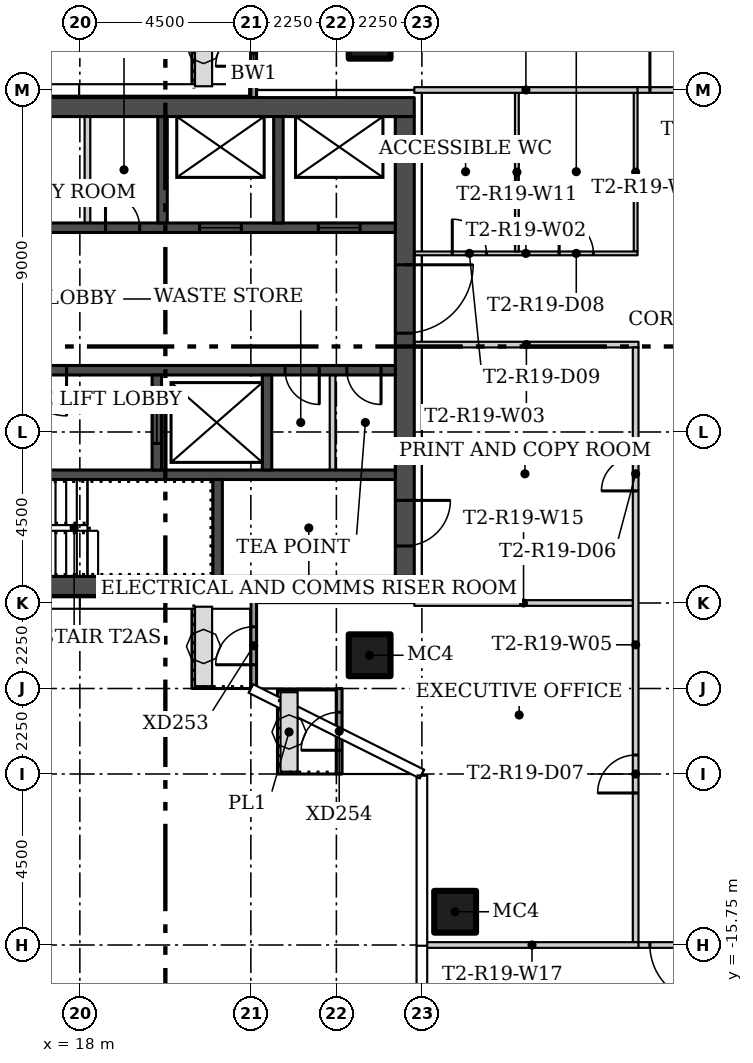
"""IFC4 building model, lengths in metres.
Left out: names, types, materials, properties, quantities, classifications, styles, units other than length and angle.
Written with IfcOpenShell. Run it as: python <this file> out.ifc"""

import sys

from ifc_helpers import new_model, si_unit, direction, frame, frame_2d, origin, origin_2d, place, context, subcontext, project, spatial, rectangle, hollow_rectangle, extrude, element, fill, save


model = new_model("IFC4")
c1 = context("Model", 3, precision=1e-05, world=origin(), true_north=direction((0.0, 1.0)))
c2 = subcontext(c1, "Body", "Model", "MODEL_VIEW")
j1 = project(units=[si_unit("LENGTHUNIT", "METRE"), si_unit("PLANEANGLEUNIT", "RADIAN")], contexts=[c1])
p1 = place(None, origin())
s1 = spatial("IfcSite", under=j1, at=p1, CompositionType="ELEMENT")
p2 = place(p1, origin())
s2 = spatial("IfcBuilding", under=s1, at=p2, CompositionType="ELEMENT")
p3 = place(p2, frame((0.0, 0.0, 170.1)))
s3 = spatial("IfcBuildingStorey", under=s2, at=p3, CompositionType="ELEMENT", Elevation=170.1)
for number, where in (
    (1, (25.625, 8.125, 0.0)),
    (2, (25.625, -8.125, 0.0)),
    (3, (27.875, -14.875, 0.0)),
):
    element("IfcColumn", number, at=place(p3, frame(where)), inside=s3, PredefinedType="COLUMN", context=c2, shape_type="SweptSolid", body=[
        extrude(hollow_rectangle(XDim=1.1, YDim=1.1, WallThickness=0.04, at=origin_2d()), origin(), (0.0, 0.0, 1.0), 3.55),
    ])
p4 = place(p3, frame((32.625, 2.5, 0.0), z_axis=(0.0, 0.0, 1.0), x_axis=(0.0, 1.0, 0.0)))
e4 = element("IfcWall", 4, at=p4, inside=s3, PredefinedType="PARTITIONING", context=c2, shape_type="SweptSolid", body=[
    extrude(rectangle(XDim=4.175, YDim=0.1, at=frame_2d((2.087, 0.0))), origin(), (0.0, 0.0, 1.0), 3.55),
])
p5 = place(p3, frame((26.8, 2.45, 0.0)))
e5 = element("IfcWall", 5, at=p5, inside=s3, PredefinedType="PARTITIONING", context=c2, shape_type="SweptSolid", body=[
    extrude(rectangle(XDim=5.875, YDim=0.1, at=frame_2d((2.938, 0.0))), origin(), (0.0, 0.0, 1.0), 3.55),
])
p6 = place(p5, frame((3.812, 0.0, 0.0)))
e6 = element("IfcOpeningElement", 6, at=p6, cuts=e5, PredefinedType="OPENING", context=c2, shape_type="SweptSolid", body=[
    extrude(rectangle(XDim=0.9, YDim=2.1, at=frame_2d((0.45, 1.05))), frame((0.0, 0.06, 0.0), z_axis=(0.0, -1.0, 0.0), x_axis=(1.0, 0.0, 0.0)), (0.0, 0.0, 1.0), 0.12),
])
p7 = place(p5, frame((1.0, 0.0, 0.0)))
e7 = element("IfcOpeningElement", 7, at=p7, cuts=e5, PredefinedType="OPENING", context=c2, shape_type="SweptSolid", body=[
    extrude(rectangle(XDim=0.9, YDim=2.1, at=frame_2d((0.45, 1.05))), frame((0.0, 0.06, 0.0), z_axis=(0.0, -1.0, 0.0), x_axis=(1.0, 0.0, 0.0)), (0.0, 0.0, 1.0), 0.12),
])
p8 = place(p3, frame((32.7, 0.05, 0.0), z_axis=(0.0, 0.0, 1.0), x_axis=(-1.0, 0.0, 0.0)))
e8 = element("IfcWall", 8, at=p8, inside=s3, PredefinedType="PARTITIONING", context=c2, shape_type="SweptSolid", body=[
    extrude(rectangle(XDim=5.9, YDim=0.15, at=frame_2d((2.95, 0.0))), origin(), (0.0, 0.0, 1.0), 3.55),
])
p9 = place(p3, frame((32.625, -15.675, 0.0), z_axis=(0.0, 0.0, 1.0), x_axis=(0.0, 1.0, 0.0)))
e9 = element("IfcWall", 9, at=p9, inside=s3, PredefinedType="PARTITIONING", context=c2, shape_type="SweptSolid", body=[
    extrude(rectangle(XDim=15.65, YDim=0.15, at=frame_2d((7.825, 0.0))), origin(), (0.0, 0.0, 1.0), 3.55),
])
p10 = place(p9, frame((11.875, 0.0, 0.0)))
e10 = element("IfcOpeningElement", 10, at=p10, cuts=e9, PredefinedType="OPENING", context=c2, shape_type="SweptSolid", body=[
    extrude(rectangle(XDim=0.9, YDim=2.1, at=frame_2d((0.45, 1.05))), frame((0.0, 0.085, 0.0), z_axis=(0.0, -1.0, 0.0), x_axis=(1.0, 0.0, 0.0)), (0.0, 0.0, 1.0), 0.17),
])
p11 = place(p9, frame((3.925, 0.0, 0.0)))
e11 = element("IfcOpeningElement", 11, at=p11, cuts=e9, PredefinedType="OPENING", context=c2, shape_type="SweptSolid", body=[
    extrude(rectangle(XDim=1.0, YDim=2.4, at=frame_2d((0.5, 1.2))), frame((0.0, 0.085, 0.0), z_axis=(0.0, -1.0, 0.0), x_axis=(1.0, 0.0, 0.0)), (0.0, 0.0, 1.0), 0.17),
])
p12 = place(p3, frame((32.575, 6.75, 0.0)))
e12 = element("IfcWall", 12, at=p12, inside=s3, PredefinedType="PARTITIONING", context=c2, shape_type="SweptSolid", body=[
    extrude(rectangle(XDim=2.375, YDim=0.15, at=frame_2d((1.188, 0.0))), origin(), (0.0, 0.0, 1.0), 3.55),
])
p13 = place(p12, frame((0.425, 0.0, 0.0)))
e13 = element("IfcOpeningElement", 13, at=p13, cuts=e12, PredefinedType="OPENING", context=c2, shape_type="SweptSolid", body=[
    extrude(rectangle(XDim=1.5, YDim=2.1, at=frame_2d((0.75, 1.05))), frame((0.0, 0.085, 0.0), z_axis=(0.0, -1.0, 0.0), x_axis=(1.0, 0.0, 0.0)), (0.0, 0.0, 1.0), 0.17),
])
p14 = place(p3, frame((34.95, -15.75, 0.0), z_axis=(0.0, 0.0, 1.0), x_axis=(-1.0, 0.0, 0.0)))
e14 = element("IfcWall", 14, at=p14, inside=s3, PredefinedType="PARTITIONING", context=c2, shape_type="SweptSolid", body=[
    extrude(rectangle(XDim=2.4, YDim=0.15, at=frame_2d((1.2, 0.0))), origin(), (0.0, 0.0, 1.0), 3.55),
])
p15 = place(p14, frame((0.45, 0.0, 0.0)))
e15 = element("IfcOpeningElement", 15, at=p15, cuts=e14, PredefinedType="OPENING", context=c2, shape_type="SweptSolid", body=[
    extrude(rectangle(XDim=1.5, YDim=2.1, at=frame_2d((0.75, 1.05))), frame((0.0, 0.085, 0.0), z_axis=(0.0, -1.0, 0.0), x_axis=(1.0, 0.0, 0.0)), (0.0, 0.0, 1.0), 0.17),
])
p16 = place(p3, frame((29.5, 6.675, 0.0), z_axis=(0.0, 0.0, 1.0), x_axis=(0.0, -1.0, 0.0)))
e16 = element("IfcWall", 16, at=p16, inside=s3, PredefinedType="PARTITIONING", context=c2, shape_type="SweptSolid", body=[
    extrude(rectangle(XDim=4.175, YDim=0.1, at=frame_2d((2.087, 0.0))), origin(), (0.0, 0.0, 1.0), 3.55),
])
p17 = place(p3, frame((32.675, 6.75, 0.0), z_axis=(0.0, 0.0, 1.0), x_axis=(-1.0, 0.0, 0.0)))
e17 = element("IfcWall", 17, at=p17, inside=s3, PredefinedType="PARTITIONING", context=c2, shape_type="SweptSolid", body=[
    extrude(rectangle(XDim=5.875, YDim=0.15, at=frame_2d((2.938, 0.0))), origin(), (0.0, 0.0, 1.0), 3.55),
])
p18 = place(p3, frame((26.8, -6.75, 0.0)))
e18 = element("IfcWall", 18, at=p18, inside=s3, PredefinedType="PARTITIONING", context=c2, shape_type="SweptSolid", body=[
    extrude(rectangle(XDim=5.75, YDim=0.15, at=frame_2d((2.875, 0.0))), origin(), (0.0, 0.0, 1.0), 3.55),
])
p19 = place(p3, frame((27.095, -15.75, 0.0)))
e19 = element("IfcWall", 19, at=p19, inside=s3, PredefinedType="PARTITIONING", context=c2, shape_type="SweptSolid", body=[
    extrude(rectangle(XDim=5.605, YDim=0.15, at=frame_2d((2.802, 0.0))), origin(), (0.0, 0.0, 1.0), 3.55),
])
p20 = place(p3, frame((22.575, 6.543, 0.0), z_axis=(0.0, 0.0, 1.0), x_axis=(0.0, 1.0, 0.0)))
e20 = element("IfcWall", 20, at=p20, inside=s3, PredefinedType="SOLIDWALL", context=c2, shape_type="SweptSolid", body=[
    extrude(rectangle(XDim=2.457, YDim=0.15, at=frame_2d((1.229, 0.0))), origin(), (0.0, 0.0, 1.0), 3.45),
])
p21 = place(p20, frame((0.832, 0.0, 0.0)))
e21 = element("IfcOpeningElement", 21, at=p21, cuts=e20, PredefinedType="OPENING", context=c2, shape_type="SweptSolid", body=[
    extrude(rectangle(XDim=1.0, YDim=2.4, at=frame_2d((0.5, 1.2))), frame((0.0, 0.085, 0.0), z_axis=(0.0, -1.0, 0.0), x_axis=(1.0, 0.0, 0.0)), (0.0, 0.0, 1.0), 0.17),
])
p22 = place(p3, frame((22.575, -9.0, 0.0), z_axis=(0.0, 0.0, 1.0), x_axis=(0.0, 1.0, 0.0)))
e22 = element("IfcWall", 22, at=p22, inside=s3, PredefinedType="SOLIDWALL", context=c2, shape_type="SweptSolid", body=[
    extrude(rectangle(XDim=2.457, YDim=0.15, at=frame_2d((1.229, 0.0))), origin(), (0.0, 0.0, 1.0), 3.45),
])
p23 = place(p22, frame((0.625, 0.0, 0.0)))
e23 = element("IfcOpeningElement", 23, at=p23, cuts=e22, PredefinedType="OPENING", context=c2, shape_type="SweptSolid", body=[
    extrude(rectangle(XDim=1.0, YDim=2.4, at=frame_2d((0.5, 1.2))), frame((0.0, 0.085, 0.0), z_axis=(0.0, -1.0, 0.0), x_axis=(1.0, 0.0, 0.0)), (0.0, 0.0, 1.0), 0.17),
])
p24 = place(p3, frame((24.825, -11.25, 0.0), z_axis=(0.0, 0.0, 1.0), x_axis=(0.0, 1.0, 0.0)))
e24 = element("IfcWall", 24, at=p24, inside=s3, PredefinedType="SOLIDWALL", context=c2, shape_type="SweptSolid", body=[
    extrude(rectangle(XDim=2.25, YDim=0.15, at=frame_2d((1.125, 0.0))), origin(), (0.0, 0.0, 1.0), 3.45),
])
p25 = place(p24, frame((0.625, 0.0, 0.0)))
e25 = element("IfcOpeningElement", 25, at=p25, cuts=e24, PredefinedType="OPENING", context=c2, shape_type="SweptSolid", body=[
    extrude(rectangle(XDim=1.0, YDim=2.4, at=frame_2d((0.5, 1.2))), frame((0.0, 0.085, 0.0), z_axis=(0.0, -1.0, 0.0), x_axis=(1.0, 0.0, 0.0)), (0.0, 0.0, 1.0), 0.17),
])
for number, where in (
    (26, (13.7, -6.3, 0.0)),
    (27, (13.7, 6.3, 0.0)),
):
    element("IfcWall", number, at=place(p3, frame(where)), inside=s3, PredefinedType="SHEAR", context=c2, shape_type="SweptSolid", body=[
        extrude(rectangle(XDim=13.1, YDim=0.5, at=frame_2d((6.55, 0.0))), origin(), (0.0, 0.0, 1.0), 3.55),
    ])
p26 = place(p3, frame((26.55, 6.05, 0.0), z_axis=(0.0, 0.0, 1.0), x_axis=(0.0, -1.0, 0.0)))
e28 = element("IfcWall", 28, at=p26, inside=s3, PredefinedType="SHEAR", context=c2, shape_type="SweptSolid", body=[
    extrude(rectangle(XDim=12.1, YDim=0.5, at=frame_2d((6.05, 0.0))), origin(), (0.0, 0.0, 1.0), 3.55),
])
p27 = place(p26, frame((10.1, 0.0, 0.0)))
e29 = element("IfcOpeningElement", 29, at=p27, cuts=e28, PredefinedType="OPENING", context=c2, shape_type="SweptSolid", body=[
    extrude(rectangle(XDim=1.2, YDim=2.1, at=frame_2d((0.6, 1.05))), frame((0.0, 0.26, 0.0), z_axis=(0.0, -1.0, 0.0), x_axis=(1.0, 0.0, 0.0)), (0.0, 0.0, 1.0), 0.52),
])
p28 = place(p26, frame((3.9, 0.0, 0.0)))
e30 = element("IfcOpeningElement", 30, at=p28, cuts=e28, PredefinedType="OPENING", context=c2, shape_type="SweptSolid", body=[
    extrude(rectangle(XDim=1.8, YDim=2.4, at=frame_2d((0.9, 1.2))), frame((0.0, 0.26, 0.0), z_axis=(0.0, -1.0, 0.0), x_axis=(1.0, 0.0, 0.0)), (0.0, 0.0, 1.0), 0.52),
])
p29 = place(p3, frame((26.3, -3.375, 0.0), z_axis=(0.0, 0.0, 1.0), x_axis=(-1.0, 0.0, 0.0)))
e31 = element("IfcWall", 31, at=p29, inside=s3, PredefinedType="SHEAR", context=c2, shape_type="SweptSolid", body=[
    extrude(rectangle(XDim=12.1, YDim=0.25, at=frame_2d((6.05, 0.0))), origin(), (0.0, 0.0, 1.0), 3.55),
])
p30 = place(p29, frame((10.95, 0.0, 0.0)))
e32 = element("IfcOpeningElement", 32, at=p30, cuts=e31, PredefinedType="OPENING", context=c2, shape_type="SweptSolid", body=[
    extrude(rectangle(XDim=1.1, YDim=2.1, at=frame_2d((0.55, 1.05))), frame((0.0, 0.135, 0.0), z_axis=(0.0, -1.0, 0.0), x_axis=(1.0, 0.0, 0.0)), (0.0, 0.0, 1.0), 0.27),
])
p31 = place(p3, frame((21.625, -6.05, 0.0), z_axis=(0.0, 0.0, 1.0), x_axis=(0.0, 1.0, 0.0)))
e33 = element("IfcWall", 33, at=p31, inside=s3, PredefinedType="SHEAR", context=c2, shape_type="SweptSolid", body=[
    extrude(rectangle(XDim=2.55, YDim=0.25, at=frame_2d((1.275, 0.0))), origin(), (0.0, 0.0, 1.0), 3.55),
])
p32 = place(p3, frame((26.3, -0.625, 0.0), z_axis=(0.0, 0.0, 1.0), x_axis=(-1.0, 0.0, 0.0)))
e34 = element("IfcWall", 34, at=p32, inside=s3, PredefinedType="SHEAR", context=c2, shape_type="SweptSolid", body=[
    extrude(rectangle(XDim=12.1, YDim=0.25, at=frame_2d((6.05, 0.0))), origin(), (0.0, 0.0, 1.0), 3.55),
])
p33 = place(p32, frame((8.65, 0.0, 0.0)))
e35 = element("IfcOpeningElement", 35, at=p33, cuts=e34, PredefinedType="OPENING", context=c2, shape_type="SweptSolid", body=[
    extrude(rectangle(XDim=1.2, YDim=2.1, at=frame_2d((0.6, 1.05))), frame((0.0, 0.135, 0.0), z_axis=(0.0, -1.0, 0.0), x_axis=(1.0, 0.0, 0.0)), (0.0, 0.0, 1.0), 0.27),
])
p34 = place(p32, frame((2.0, 0.0, 0.0)))
e36 = element("IfcOpeningElement", 36, at=p34, cuts=e34, PredefinedType="OPENING", context=c2, shape_type="SweptSolid", body=[
    extrude(rectangle(XDim=0.9, YDim=2.1, at=frame_2d((0.45, 1.05))), frame((0.0, 0.135, 0.0), z_axis=(0.0, -1.0, 0.0), x_axis=(1.0, 0.0, 0.0)), (0.0, 0.0, 1.0), 0.27),
])
p35 = place(p32, frame((0.375, 0.0, 0.0)))
e37 = element("IfcOpeningElement", 37, at=p35, cuts=e34, PredefinedType="OPENING", context=c2, shape_type="SweptSolid", body=[
    extrude(rectangle(XDim=0.9, YDim=2.1, at=frame_2d((0.45, 1.05))), frame((0.0, 0.135, 0.0), z_axis=(0.0, -1.0, 0.0), x_axis=(1.0, 0.0, 0.0)), (0.0, 0.0, 1.0), 0.27),
])
p36 = place(p3, frame((20.025, -3.25, 0.0), z_axis=(0.0, 0.0, 1.0), x_axis=(0.0, 1.0, 0.0)))
e38 = element("IfcWall", 38, at=p36, inside=s3, PredefinedType="SHEAR", context=c2, shape_type="SweptSolid", body=[
    extrude(rectangle(XDim=2.5, YDim=0.25, at=frame_2d((1.25, 0.0))), origin(), (0.0, 0.0, 1.0), 3.55),
])
p37 = place(p36, frame((0.7, 0.0, 0.0)))
e39 = element("IfcOpeningElement", 39, at=p37, cuts=e38, PredefinedType="OPENING", context=c2, shape_type="SweptSolid", body=[
    extrude(rectangle(XDim=1.1, YDim=2.1, at=frame_2d((0.55, 1.05))), frame((0.0, 0.135, 0.0), z_axis=(0.0, -1.0, 0.0), x_axis=(1.0, 0.0, 0.0)), (0.0, 0.0, 1.0), 0.27),
])
p38 = place(p3, frame((22.925, -3.25, 0.0), z_axis=(0.0, 0.0, 1.0), x_axis=(0.0, 1.0, 0.0)))
e40 = element("IfcWall", 40, at=p38, inside=s3, PredefinedType="SHEAR", context=c2, shape_type="SweptSolid", body=[
    extrude(rectangle(XDim=2.5, YDim=0.25, at=frame_2d((1.25, 0.0))), origin(), (0.0, 0.0, 1.0), 3.55),
])
p39 = place(p3, frame((24.65, -3.25, 0.0), z_axis=(0.0, 0.0, 1.0), x_axis=(0.0, 1.0, 0.0)))
e41 = element("IfcWall", 41, at=p39, inside=s3, PredefinedType="PARTITIONING", context=c2, shape_type="SweptSolid", body=[
    extrude(rectangle(XDim=2.5, YDim=0.15, at=frame_2d((1.25, 0.0))), origin(), (0.0, 0.0, 1.0), 3.55),
])
p40 = place(p3, frame((14.2, 3.125, 0.0)))
e42 = element("IfcWall", 42, at=p40, inside=s3, PredefinedType="SHEAR", context=c2, shape_type="SweptSolid", body=[
    extrude(rectangle(XDim=12.1, YDim=0.25, at=frame_2d((6.05, 0.0))), origin(), (0.0, 0.0, 1.0), 3.55),
])
p41 = place(p40, frame((6.95, 0.0, 0.0)))
e43 = element("IfcOpeningElement", 43, at=p41, cuts=e42, PredefinedType="OPENING", context=c2, shape_type="SweptSolid", body=[
    extrude(rectangle(XDim=1.1, YDim=2.1, at=frame_2d((0.55, 1.05))), frame((0.0, 0.135, 0.0), z_axis=(0.0, -1.0, 0.0), x_axis=(1.0, 0.0, 0.0)), (0.0, 0.0, 1.0), 0.27),
])
p42 = place(p40, frame((10.075, 0.0, 0.0)))
e44 = element("IfcOpeningElement", 44, at=p42, cuts=e42, PredefinedType="OPENING", context=c2, shape_type="SweptSolid", body=[
    extrude(rectangle(XDim=1.1, YDim=2.1, at=frame_2d((0.55, 1.05))), frame((0.0, 0.135, 0.0), z_axis=(0.0, -1.0, 0.0), x_axis=(1.0, 0.0, 0.0)), (0.0, 0.0, 1.0), 0.27),
])
p43 = place(p40, frame((1.55, 0.0, 0.0)))
e45 = element("IfcOpeningElement", 45, at=p43, cuts=e42, PredefinedType="OPENING", context=c2, shape_type="SweptSolid", body=[
    extrude(rectangle(XDim=0.9, YDim=2.1, at=frame_2d((0.45, 1.05))), frame((0.0, 0.135, 0.0), z_axis=(0.0, -1.0, 0.0), x_axis=(1.0, 0.0, 0.0)), (0.0, 0.0, 1.0), 0.27),
])
p44 = place(p40, frame((4.475, 0.0, 0.0)))
e46 = element("IfcOpeningElement", 46, at=p44, cuts=e42, PredefinedType="OPENING", context=c2, shape_type="SweptSolid", body=[
    extrude(rectangle(XDim=0.9, YDim=2.1, at=frame_2d((0.45, 1.05))), frame((0.0, 0.135, 0.0), z_axis=(0.0, -1.0, 0.0), x_axis=(1.0, 0.0, 0.0)), (0.0, 0.0, 1.0), 0.27),
])
for number, where, z_axis, x_axis in (
    (47, (20.175, 3.25, 0.0), (0.0, 0.0, 1.0), (0.0, 1.0, 0.0)),
    (48, (23.225, 3.25, 0.0), (0.0, 0.0, 1.0), (0.0, 1.0, 0.0)),
):
    element("IfcWall", number, at=place(p3, frame(where, z_axis=z_axis, x_axis=x_axis)), inside=s3, PredefinedType="SHEAR", context=c2, shape_type="SweptSolid", body=[
        extrude(rectangle(XDim=2.8, YDim=0.25, at=frame_2d((1.4, 0.0))), origin(), (0.0, 0.0, 1.0), 3.55),
    ])
p45 = place(p3, frame((18.2, 3.25, 0.0), z_axis=(0.0, 0.0, 1.0), x_axis=(0.0, 1.0, 0.0)))
e49 = element("IfcWall", 49, at=p45, inside=s3, PredefinedType="PARTITIONING", context=c2, shape_type="SweptSolid", body=[
    extrude(rectangle(XDim=2.8, YDim=0.15, at=frame_2d((1.4, 0.0))), origin(), (0.0, 0.0, 1.0), 3.55),
])
p46 = place(p13, origin())
e50 = element("IfcDoor", 50, at=p46, inside=s3, OperationType="DOUBLE_DOOR_SINGLE_SWING", PredefinedType="DOOR", context=c2, shape_type="SweptSolid", body=[
    extrude(rectangle(XDim=1.5, YDim=2.1, at=frame_2d((0.75, 1.05))), frame((0.0, 0.025, 0.0), z_axis=(0.0, -1.0, 0.0), x_axis=(1.0, 0.0, 0.0)), (0.0, 0.0, 1.0), 0.05),
])
fill(e13, e50)
p47 = place(p15, origin())
e51 = element("IfcDoor", 51, at=p47, inside=s3, OperationType="DOUBLE_DOOR_SINGLE_SWING", PredefinedType="DOOR", context=c2, shape_type="SweptSolid", body=[
    extrude(rectangle(XDim=1.5, YDim=2.1, at=frame_2d((0.75, 1.05))), frame((0.0, 0.025, 0.0), z_axis=(0.0, -1.0, 0.0), x_axis=(1.0, 0.0, 0.0)), (0.0, 0.0, 1.0), 0.05),
])
fill(e15, e51)
p48 = place(p10, origin())
e52 = element("IfcDoor", 52, at=p48, inside=s3, OperationType="SINGLE_SWING_RIGHT", PredefinedType="DOOR", context=c2, shape_type="SweptSolid", body=[
    extrude(rectangle(XDim=0.9, YDim=2.1, at=frame_2d((0.45, 1.05))), frame((0.0, 0.025, 0.0), z_axis=(0.0, -1.0, 0.0), x_axis=(1.0, 0.0, 0.0)), (0.0, 0.0, 1.0), 0.05),
])
fill(e10, e52)
p49 = place(p11, origin())
e53 = element("IfcDoor", 53, at=p49, inside=s3, OperationType="SINGLE_SWING_LEFT", PredefinedType="DOOR", context=c2, shape_type="SweptSolid", body=[
    extrude(rectangle(XDim=1.0, YDim=2.4, at=frame_2d((0.5, 1.2))), frame((0.0, 0.025, 0.0), z_axis=(0.0, -1.0, 0.0), x_axis=(1.0, 0.0, 0.0)), (0.0, 0.0, 1.0), 0.05),
])
fill(e11, e53)
p50 = place(p6, origin())
e54 = element("IfcDoor", 54, at=p50, inside=s3, OperationType="SINGLE_SWING_LEFT", PredefinedType="DOOR", context=c2, shape_type="SweptSolid", body=[
    extrude(rectangle(XDim=0.9, YDim=2.1, at=frame_2d((0.45, 1.05))), frame((0.0, 0.025, 0.0), z_axis=(0.0, -1.0, 0.0), x_axis=(1.0, 0.0, 0.0)), (0.0, 0.0, 1.0), 0.05),
])
fill(e6, e54)
p51 = place(p7, origin())
e55 = element("IfcDoor", 55, at=p51, inside=s3, OperationType="SINGLE_SWING_RIGHT", PredefinedType="DOOR", context=c2, shape_type="SweptSolid", body=[
    extrude(rectangle(XDim=0.9, YDim=2.1, at=frame_2d((0.45, 1.05))), frame((0.0, 0.025, 0.0), z_axis=(0.0, -1.0, 0.0), x_axis=(1.0, 0.0, 0.0)), (0.0, 0.0, 1.0), 0.05),
])
fill(e7, e55)
p52 = place(p21, origin())
e56 = element("IfcDoor", 56, at=p52, inside=s3, OperationType="SINGLE_SWING_LEFT", PredefinedType="DOOR", context=c2, shape_type="SweptSolid", body=[
    extrude(rectangle(XDim=1.0, YDim=2.4, at=frame_2d((0.5, 1.2))), frame((0.0, 0.025, 0.0), z_axis=(0.0, -1.0, 0.0), x_axis=(1.0, 0.0, 0.0)), (0.0, 0.0, 1.0), 0.05),
])
fill(e21, e56)
p53 = place(p23, origin())
e57 = element("IfcDoor", 57, at=p53, inside=s3, OperationType="SINGLE_SWING_LEFT", PredefinedType="DOOR", context=c2, shape_type="SweptSolid", body=[
    extrude(rectangle(XDim=1.0, YDim=2.4, at=frame_2d((0.5, 1.2))), frame((0.0, 0.025, 0.0), z_axis=(0.0, -1.0, 0.0), x_axis=(1.0, 0.0, 0.0)), (0.0, 0.0, 1.0), 0.05),
])
fill(e23, e57)
p54 = place(p25, origin())
e58 = element("IfcDoor", 58, at=p54, inside=s3, OperationType="SINGLE_SWING_RIGHT", PredefinedType="DOOR", context=c2, shape_type="SweptSolid", body=[
    extrude(rectangle(XDim=1.0, YDim=2.4, at=frame_2d((0.5, 1.2))), frame((0.0, 0.025, 0.0), z_axis=(0.0, -1.0, 0.0), x_axis=(1.0, 0.0, 0.0)), (0.0, 0.0, 1.0), 0.05),
])
fill(e25, e58)
p55 = place(p27, origin())
e59 = element("IfcDoor", 59, at=p55, inside=s3, OperationType="SINGLE_SWING_RIGHT", PredefinedType="DOOR", context=c2, shape_type="SweptSolid", body=[
    extrude(rectangle(XDim=1.2, YDim=2.1, at=frame_2d((0.6, 1.05))), frame((0.0, 0.025, 0.0), z_axis=(0.0, -1.0, 0.0), x_axis=(1.0, 0.0, 0.0)), (0.0, 0.0, 1.0), 0.05),
])
fill(e29, e59)
p56 = place(p28, origin())
e60 = element("IfcDoor", 60, at=p56, inside=s3, OperationType="DOUBLE_DOOR_SINGLE_SWING", PredefinedType="DOOR", context=c2, shape_type="SweptSolid", body=[
    extrude(rectangle(XDim=1.8, YDim=2.4, at=frame_2d((0.9, 1.2))), frame((0.0, 0.025, 0.0), z_axis=(0.0, -1.0, 0.0), x_axis=(1.0, 0.0, 0.0)), (0.0, 0.0, 1.0), 0.05),
])
fill(e30, e60)
p57 = place(p33, origin())
e61 = element("IfcDoor", 61, at=p57, inside=s3, OperationType="SINGLE_SWING_RIGHT", PredefinedType="DOOR", context=c2, shape_type="SweptSolid", body=[
    extrude(rectangle(XDim=1.2, YDim=2.1, at=frame_2d((0.6, 1.05))), frame((0.0, 0.025, 0.0), z_axis=(0.0, -1.0, 0.0), x_axis=(1.0, 0.0, 0.0)), (0.0, 0.0, 1.0), 0.05),
])
fill(e35, e61)
p58 = place(p34, origin())
e62 = element("IfcDoor", 62, at=p58, inside=s3, OperationType="SINGLE_SWING_LEFT", PredefinedType="DOOR", context=c2, shape_type="SweptSolid", body=[
    extrude(rectangle(XDim=0.9, YDim=2.1, at=frame_2d((0.45, 1.05))), frame((0.0, 0.025, 0.0), z_axis=(0.0, -1.0, 0.0), x_axis=(1.0, 0.0, 0.0)), (0.0, 0.0, 1.0), 0.05),
])
fill(e36, e62)
p59 = place(p35, origin())
e63 = element("IfcDoor", 63, at=p59, inside=s3, OperationType="SINGLE_SWING_LEFT", PredefinedType="DOOR", context=c2, shape_type="SweptSolid", body=[
    extrude(rectangle(XDim=0.9, YDim=2.1, at=frame_2d((0.45, 1.05))), frame((0.0, 0.025, 0.0), z_axis=(0.0, -1.0, 0.0), x_axis=(1.0, 0.0, 0.0)), (0.0, 0.0, 1.0), 0.05),
])
fill(e37, e63)
p60 = place(p37, origin())
e64 = element("IfcDoor", 64, at=p60, inside=s3, OperationType="SLIDING_TO_LEFT", PredefinedType="DOOR", context=c2, shape_type="SweptSolid", body=[
    extrude(rectangle(XDim=1.1, YDim=2.1, at=frame_2d((0.55, 1.05))), frame((0.0, 0.025, 0.0), z_axis=(0.0, -1.0, 0.0), x_axis=(1.0, 0.0, 0.0)), (0.0, 0.0, 1.0), 0.05),
])
fill(e39, e64)
p61 = place(p41, origin())
e65 = element("IfcDoor", 65, at=p61, inside=s3, OperationType="SLIDING_TO_LEFT", PredefinedType="DOOR", context=c2, shape_type="SweptSolid", body=[
    extrude(rectangle(XDim=1.1, YDim=2.1, at=frame_2d((0.55, 1.05))), frame((0.0, 0.025, 0.0), z_axis=(0.0, -1.0, 0.0), x_axis=(1.0, 0.0, 0.0)), (0.0, 0.0, 1.0), 0.05),
])
fill(e43, e65)
p62 = place(p42, origin())
e66 = element("IfcDoor", 66, at=p62, inside=s3, OperationType="SLIDING_TO_LEFT", PredefinedType="DOOR", context=c2, shape_type="SweptSolid", body=[
    extrude(rectangle(XDim=1.1, YDim=2.1, at=frame_2d((0.55, 1.05))), frame((0.0, 0.025, 0.0), z_axis=(0.0, -1.0, 0.0), x_axis=(1.0, 0.0, 0.0)), (0.0, 0.0, 1.0), 0.05),
])
fill(e44, e66)
p63 = place(p44, origin())
e67 = element("IfcDoor", 67, at=p63, inside=s3, OperationType="SINGLE_SWING_LEFT", PredefinedType="DOOR", context=c2, shape_type="SweptSolid", body=[
    extrude(rectangle(XDim=0.9, YDim=2.1, at=frame_2d((0.45, 1.05))), frame((0.0, 0.025, 0.0), z_axis=(0.0, -1.0, 0.0), x_axis=(1.0, 0.0, 0.0)), (0.0, 0.0, 1.0), 0.05),
])
fill(e46, e67)
save(model, sys.argv[1])
